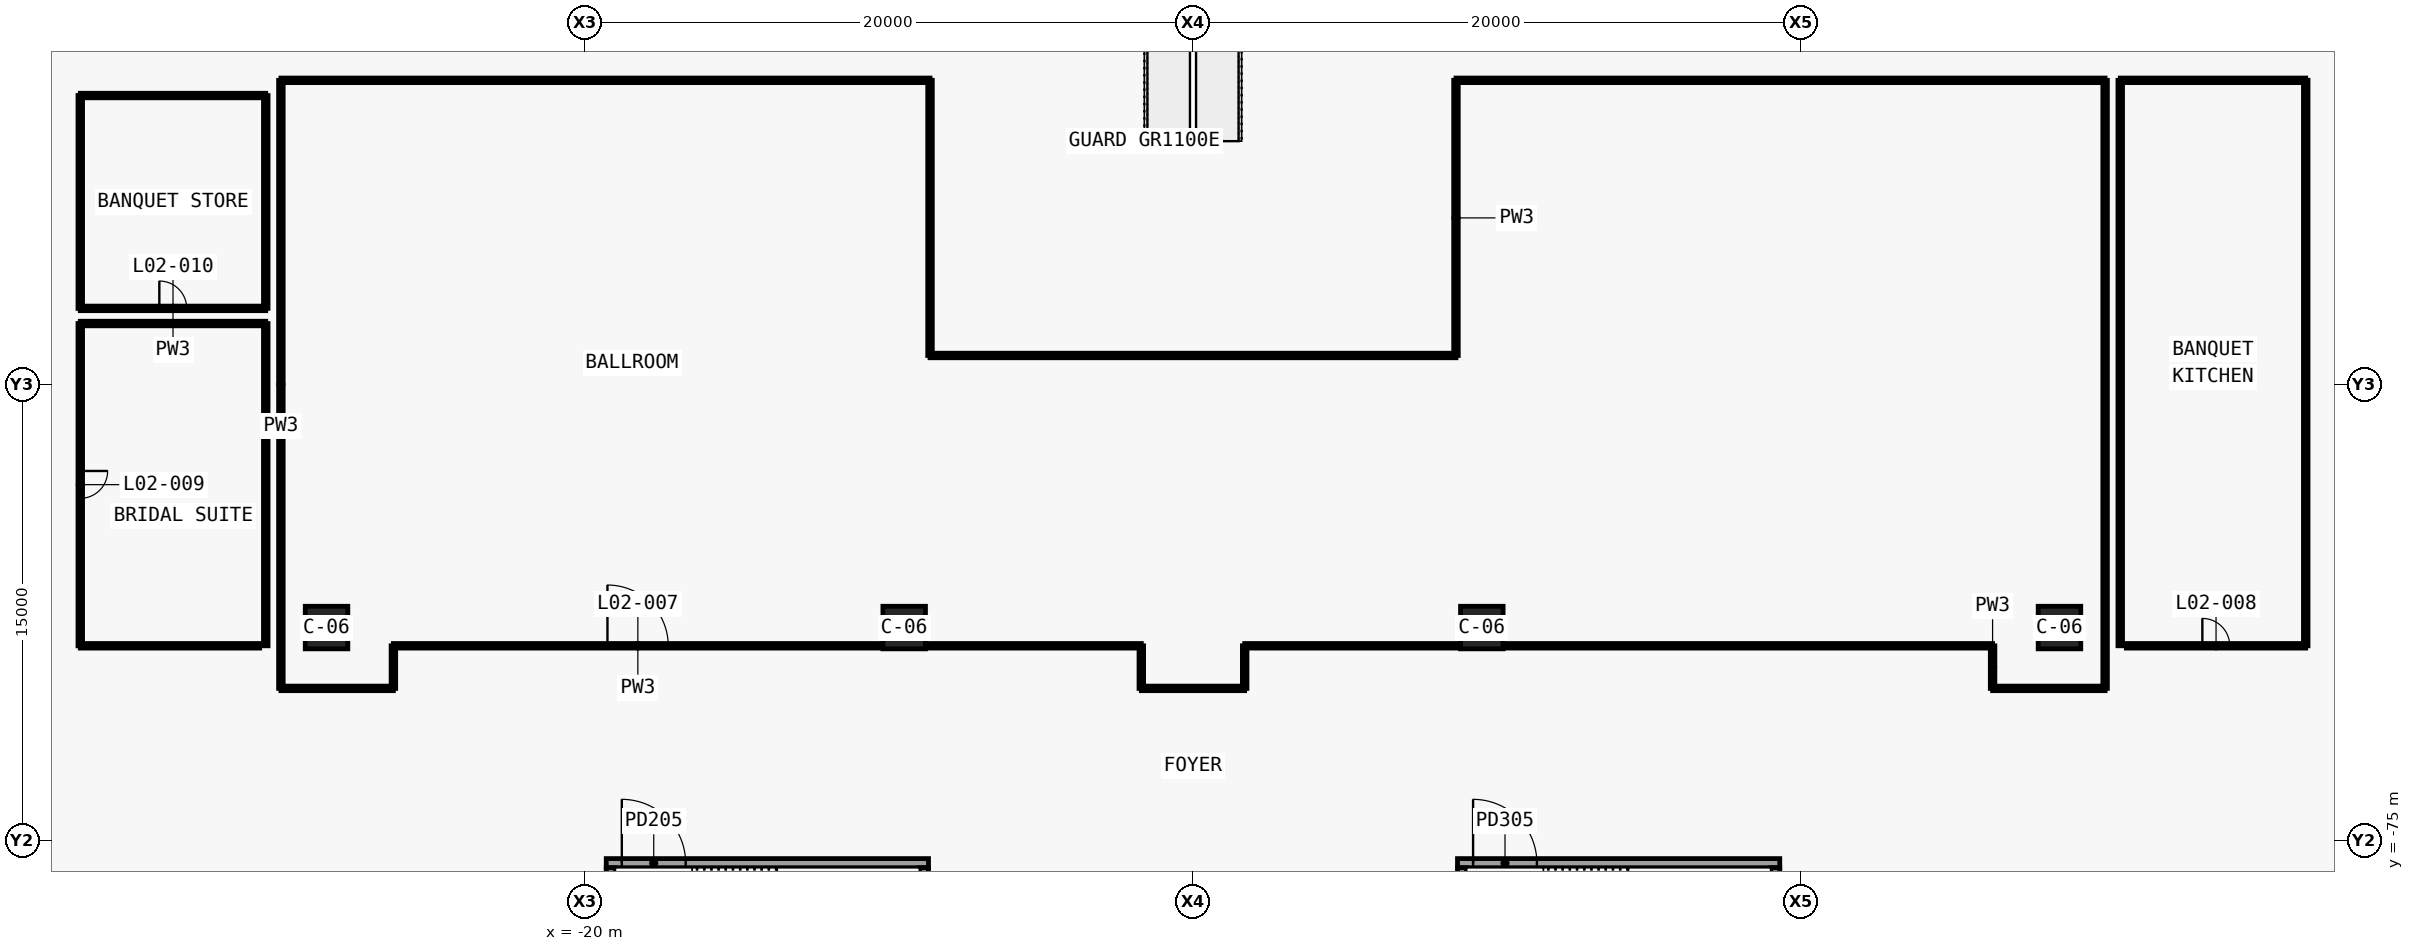
"""IFC4 building model, lengths in metres.
Left out: names, types, materials, properties, quantities, classifications, styles, units other than length and angle.
Written with IfcOpenShell. Run it as: python <this file> out.ifc"""

import sys

from ifc_helpers import new_model, si_unit, direction, frame, frame_2d, origin, origin_2d, place, context, subcontext, project, spatial, rectangle, extrude, element, fill, save


model = new_model("IFC4")
c1 = context("Model", 3, precision=1e-05, world=origin(), true_north=direction((0.0, 1.0)))
c2 = subcontext(c1, "Body", "Model", "MODEL_VIEW")
j1 = project(units=[si_unit("LENGTHUNIT", "METRE"), si_unit("PLANEANGLEUNIT", "RADIAN")], contexts=[c1])
p1 = place(None, origin())
s1 = spatial("IfcSite", under=j1, at=p1, CompositionType="ELEMENT")
p2 = place(p1, origin())
s2 = spatial("IfcBuilding", under=s1, at=p2, CompositionType="ELEMENT")
p3 = place(p2, frame((0.0, 0.0, 18.0)))
s3 = spatial("IfcBuildingStorey", under=s2, at=p3, CompositionType="ELEMENT", Elevation=18.0)
p4 = place(p3, frame((-19.3, -75.75, 0.0), z_axis=(0.0, 0.0, 1.0), x_axis=(1.0, 0.0, 0.0)))
e1 = element("IfcWall", 1, at=p4, inside=s3, PredefinedType="SOLIDWALL", context=c2, shape_type="SweptSolid", body=[
    extrude(rectangle(XDim=10.6, YDim=0.3, at=frame_2d((5.3, 0.0))), origin(), (0.0, 0.0, 1.0), 8.0),
])
p5 = place(p4, frame((0.512, 0.0, 0.0)))
e2 = element("IfcOpeningElement", 2, at=p5, cuts=e1, PredefinedType="OPENING", context=c2, shape_type="SweptSolid", body=[
    extrude(rectangle(XDim=2.1, YDim=2.1, at=frame_2d((1.05, 1.05))), frame((0.0, 0.16, 0.0), z_axis=(0.0, -1.0, 0.0), x_axis=(1.0, 0.0, 0.0)), (0.0, 0.0, 1.0), 0.32),
])
for number, where, z_axis, x_axis in (
    (3, (-19.15, -81.1, 0.0), (0.0, 0.0, 1.0), (0.0, 1.0, 0.0)),
    (4, (-8.85, -81.1, 0.0), (0.0, 0.0, 1.0), (0.0, 1.0, 0.0)),
):
    element("IfcWall", number, at=place(p3, frame(where, z_axis=z_axis, x_axis=x_axis)), inside=s3, PredefinedType="SOLIDWALL", context=c2, shape_type="SweptSolid", body=[
        extrude(rectangle(XDim=5.2, YDim=0.3, at=frame_2d((2.6, 0.0))), origin(), (0.0, 0.0, 1.0), 8.0),
    ])
p6 = place(p3, frame((8.7, -75.75, 0.0), z_axis=(0.0, 0.0, 1.0), x_axis=(1.0, 0.0, 0.0)))
e5 = element("IfcWall", 5, at=p6, inside=s3, PredefinedType="SOLIDWALL", context=c2, shape_type="SweptSolid", body=[
    extrude(rectangle(XDim=10.6, YDim=0.3, at=frame_2d((5.3, 0.0))), origin(), (0.0, 0.0, 1.0), 8.0),
])
p7 = place(p6, frame((0.512, 0.0, 0.0)))
e6 = element("IfcOpeningElement", 6, at=p7, cuts=e5, PredefinedType="OPENING", context=c2, shape_type="SweptSolid", body=[
    extrude(rectangle(XDim=2.1, YDim=2.1, at=frame_2d((1.05, 1.05))), frame((0.0, 0.16, 0.0), z_axis=(0.0, -1.0, 0.0), x_axis=(1.0, 0.0, 0.0)), (0.0, 0.0, 1.0), 0.32),
])
for number, where, z_axis, x_axis in (
    (7, (8.85, -81.1, 0.0), (0.0, 0.0, 1.0), (0.0, 1.0, 0.0)),
    (8, (19.15, -81.1, 0.0), (0.0, 0.0, 1.0), (0.0, 1.0, 0.0)),
):
    element("IfcWall", number, at=place(p3, frame(where, z_axis=z_axis, x_axis=x_axis)), inside=s3, PredefinedType="SOLIDWALL", context=c2, shape_type="SweptSolid", body=[
        extrude(rectangle(XDim=5.2, YDim=0.3, at=frame_2d((2.6, 0.0))), origin(), (0.0, 0.0, 1.0), 8.0),
    ])
for number, where, z_axis, x_axis in (
    (9, (-28.5, -68.0, 0.0), (0.0, 0.0, 1.0), (1.0, 0.0, 0.0)),
    (10, (-9.5, -68.0, 0.0), (0.0, 0.0, 1.0), (1.0, 0.0, 0.0)),
    (11, (9.5, -68.0, 0.0), (0.0, 0.0, 1.0), (1.0, 0.0, 0.0)),
    (12, (28.5, -68.0, 0.0), (0.0, 0.0, 1.0), (1.0, 0.0, 0.0)),
):
    element("IfcColumn", number, at=place(p3, frame(where, z_axis=z_axis, x_axis=x_axis)), inside=s3, PredefinedType="COLUMN", context=c2, shape_type="SweptSolid", body=[
        extrude(rectangle(XDim=1.4, YDim=1.4, at=origin_2d()), origin(), (0.0, 0.0, 1.0), 8.0),
    ])
p8 = place(p3, frame((26.301, -70.001, 0.0), z_axis=(0.0, 0.0, 1.0), x_axis=(1.0, 0.0, 0.0)))
e13 = element("IfcWall", 13, at=p8, inside=s3, PredefinedType="PARTITIONING", context=c2, shape_type="SweptSolid", body=[
    extrude(rectangle(XDim=3.699, YDim=0.15, at=frame_2d((1.85, 0.0))), origin(), (0.0, 0.0, 1.0), 6.58),
])
p9 = place(p3, frame((30.001, -70.0, 0.0), z_axis=(0.0, 0.0, 1.0), x_axis=(0.0, 1.0, 0.0)))
e14 = element("IfcWall", 14, at=p9, inside=s3, PredefinedType="PARTITIONING", context=c2, shape_type="SweptSolid", body=[
    extrude(rectangle(XDim=20.0, YDim=0.15, at=frame_2d((10.0, 0.0))), origin(), (0.0, 0.0, 1.0), 6.58),
])
for number, where, z_axis, x_axis in (
    (15, (30.0, -49.999, 0.0), (0.0, 0.0, 1.0), (-1.0, 0.0, 0.0)),
    (16, (-8.651, -49.999, 0.0), (0.0, 0.0, 1.0), (-1.0, 0.0, 0.0)),
):
    element("IfcWall", number, at=place(p3, frame(where, z_axis=z_axis, x_axis=x_axis)), inside=s3, PredefinedType="PARTITIONING", context=c2, shape_type="SweptSolid", body=[
        extrude(rectangle(XDim=21.349, YDim=0.15, at=frame_2d((10.675, 0.0))), origin(), (0.0, 0.0, 1.0), 6.58),
    ])
p10 = place(p3, frame((-30.001, -50.0, 0.0), z_axis=(0.0, 0.0, 1.0), x_axis=(0.0, -1.0, 0.0)))
e17 = element("IfcWall", 17, at=p10, inside=s3, PredefinedType="PARTITIONING", context=c2, shape_type="SweptSolid", body=[
    extrude(rectangle(XDim=20.0, YDim=0.15, at=frame_2d((10.0, 0.0))), origin(), (0.0, 0.0, 1.0), 6.58),
])
p11 = place(p3, frame((-30.0, -70.001, 0.0), z_axis=(0.0, 0.0, 1.0), x_axis=(1.0, 0.0, 0.0)))
e18 = element("IfcWall", 18, at=p11, inside=s3, PredefinedType="PARTITIONING", context=c2, shape_type="SweptSolid", body=[
    extrude(rectangle(XDim=3.699, YDim=0.15, at=frame_2d((1.85, 0.0))), origin(), (0.0, 0.0, 1.0), 6.58),
])
p12 = place(p3, frame((36.599, -49.999, 0.0), z_axis=(0.0, 0.0, 1.0), x_axis=(-1.0, 0.0, 0.0)))
e19 = element("IfcWall", 19, at=p12, inside=s3, PredefinedType="PARTITIONING", context=c2, shape_type="SweptSolid", body=[
    extrude(rectangle(XDim=6.099, YDim=0.15, at=frame_2d((3.05, 0.0))), origin(), (0.0, 0.0, 1.0), 7.6),
])
p13 = place(p3, frame((30.499, -50.0, 0.0), z_axis=(0.0, 0.0, 1.0), x_axis=(0.0, -1.0, 0.0)))
e20 = element("IfcWall", 20, at=p13, inside=s3, PredefinedType="PARTITIONING", context=c2, shape_type="SweptSolid", body=[
    extrude(rectangle(XDim=18.599, YDim=0.15, at=frame_2d((9.3, 0.0))), origin(), (0.0, 0.0, 1.0), 6.58),
])
p14 = place(p3, frame((-30.499, -68.6, 0.0), z_axis=(0.0, 0.0, 1.0), x_axis=(0.0, 1.0, 0.0)))
e21 = element("IfcWall", 21, at=p14, inside=s3, PredefinedType="PARTITIONING", context=c2, shape_type="SweptSolid", body=[
    extrude(rectangle(XDim=10.6, YDim=0.15, at=frame_2d((5.3, 0.0))), origin(), (0.0, 0.0, 1.0), 6.58),
])
p15 = place(p3, frame((-30.5, -57.999, 0.0), z_axis=(0.0, 0.0, 1.0), x_axis=(-1.0, 0.0, 0.0)))
e22 = element("IfcWall", 22, at=p15, inside=s3, PredefinedType="PARTITIONING", context=c2, shape_type="SweptSolid", body=[
    extrude(rectangle(XDim=6.099, YDim=0.15, at=frame_2d((3.05, 0.0))), origin(), (0.0, 0.0, 1.0), 7.6),
])
p16 = place(p3, frame((-36.599, -57.501, 0.0), z_axis=(0.0, 0.0, 1.0), x_axis=(1.0, 0.0, 0.0)))
e23 = element("IfcWall", 23, at=p16, inside=s3, PredefinedType="PARTITIONING", context=c2, shape_type="SweptSolid", body=[
    extrude(rectangle(XDim=6.099, YDim=0.15, at=frame_2d((3.05, 0.0))), origin(), (0.0, 0.0, 1.0), 7.6),
])
p17 = place(p16, frame((2.6, 0.0, 0.0)))
e24 = element("IfcOpeningElement", 24, at=p17, cuts=e23, PredefinedType="OPENING", context=c2, shape_type="SweptSolid", body=[
    extrude(rectangle(XDim=0.9, YDim=2.1, at=frame_2d((0.45, 1.05))), frame((0.0, 0.085, 0.0), z_axis=(0.0, -1.0, 0.0), x_axis=(1.0, 0.0, 0.0)), (0.0, 0.0, 1.0), 0.17),
])
p18 = place(p3, frame((-30.499, -57.5, 0.0), z_axis=(0.0, 0.0, 1.0), x_axis=(0.0, 1.0, 0.0)))
e25 = element("IfcWall", 25, at=p18, inside=s3, PredefinedType="PARTITIONING", context=c2, shape_type="SweptSolid", body=[
    extrude(rectangle(XDim=7.0, YDim=0.15, at=frame_2d((3.5, 0.0))), origin(), (0.0, 0.0, 1.0), 6.98),
])
p19 = place(p3, frame((-30.5, -50.499, 0.0), z_axis=(0.0, 0.0, 1.0), x_axis=(-1.0, 0.0, 0.0)))
e26 = element("IfcWall", 26, at=p19, inside=s3, PredefinedType="PARTITIONING", context=c2, shape_type="SweptSolid", body=[
    extrude(rectangle(XDim=6.099, YDim=0.15, at=frame_2d((3.05, 0.0))), origin(), (0.0, 0.0, 1.0), 7.6),
])
p20 = place(p3, frame((-1.699, -70.001, 0.0), z_axis=(0.0, 0.0, 1.0), x_axis=(1.0, 0.0, 0.0)))
e27 = element("IfcWall", 27, at=p20, inside=s3, PredefinedType="PARTITIONING", context=c2, shape_type="SweptSolid", body=[
    extrude(rectangle(XDim=3.398, YDim=0.15, at=frame_2d((1.699, 0.0))), origin(), (0.0, 0.0, 1.0), 7.6),
])
p21 = place(p3, frame((-26.3, -70.002, 0.0), z_axis=(0.0, 0.0, 1.0), x_axis=(0.0, 1.0, 0.0)))
e28 = element("IfcWall", 28, at=p21, inside=s3, PredefinedType="PARTITIONING", context=c2, shape_type="SweptSolid", body=[
    extrude(rectangle(XDim=1.402, YDim=0.15, at=frame_2d((0.701, 0.0))), origin(), (0.0, 0.0, 1.0), 7.6),
])
p22 = place(p3, frame((-26.3, -68.6, 0.0), z_axis=(0.0, 0.0, 1.0), x_axis=(1.0, 0.0, 0.0)))
e29 = element("IfcWall", 29, at=p22, inside=s3, PredefinedType="PARTITIONING", context=c2, shape_type="SweptSolid", body=[
    extrude(rectangle(XDim=16.08, YDim=0.15, at=frame_2d((8.04, 0.0))), origin(), (0.0, 0.0, 1.0), 7.6),
])
p23 = place(p22, frame((7.04, 0.0, 0.0)))
e30 = element("IfcOpeningElement", 30, at=p23, cuts=e29, PredefinedType="OPENING", context=c2, shape_type="SweptSolid", body=[
    extrude(rectangle(XDim=2.0, YDim=2.4, at=frame_2d((1.0, 1.2))), frame((0.0, 0.085, 0.0), z_axis=(0.0, -1.0, 0.0), x_axis=(1.0, 0.0, 0.0)), (0.0, 0.0, 1.0), 0.17),
])
p24 = place(p3, frame((-8.78, -68.6, 0.0), z_axis=(0.0, 0.0, 1.0), x_axis=(1.0, 0.0, 0.0)))
e31 = element("IfcWall", 31, at=p24, inside=s3, PredefinedType="PARTITIONING", context=c2, shape_type="SweptSolid", body=[
    extrude(rectangle(XDim=7.08, YDim=0.15, at=frame_2d((3.54, 0.0))), origin(), (0.0, 0.0, 1.0), 7.6),
])
for number, where, z_axis, x_axis in (
    (32, (-1.7, -68.6, 0.0), (0.0, 0.0, 1.0), (0.0, -1.0, 0.0)),
    (33, (1.7, -70.002, 0.0), (0.0, 0.0, 1.0), (0.0, 1.0, 0.0)),
):
    element("IfcWall", number, at=place(p3, frame(where, z_axis=z_axis, x_axis=x_axis)), inside=s3, PredefinedType="PARTITIONING", context=c2, shape_type="SweptSolid", body=[
        extrude(rectangle(XDim=1.402, YDim=0.15, at=frame_2d((0.701, 0.0))), origin(), (0.0, 0.0, 1.0), 7.6),
    ])
p25 = place(p3, frame((1.7, -68.6, 0.0), z_axis=(0.0, 0.0, 1.0), x_axis=(1.0, 0.0, 0.0)))
e34 = element("IfcWall", 34, at=p25, inside=s3, PredefinedType="PARTITIONING", context=c2, shape_type="SweptSolid", body=[
    extrude(rectangle(XDim=7.08, YDim=0.15, at=frame_2d((3.54, 0.0))), origin(), (0.0, 0.0, 1.0), 7.6),
])
p26 = place(p3, frame((10.22, -68.6, 0.0), z_axis=(0.0, 0.0, 1.0), x_axis=(1.0, 0.0, 0.0)))
e35 = element("IfcWall", 35, at=p26, inside=s3, PredefinedType="PARTITIONING", context=c2, shape_type="SweptSolid", body=[
    extrude(rectangle(XDim=16.08, YDim=0.15, at=frame_2d((8.04, 0.0))), origin(), (0.0, 0.0, 1.0), 7.6),
])
p27 = place(p3, frame((26.3, -68.6, 0.0), z_axis=(0.0, 0.0, 1.0), x_axis=(0.0, -1.0, 0.0)))
e36 = element("IfcWall", 36, at=p27, inside=s3, PredefinedType="PARTITIONING", context=c2, shape_type="SweptSolid", body=[
    extrude(rectangle(XDim=1.402, YDim=0.15, at=frame_2d((0.701, 0.0))), origin(), (0.0, 0.0, 1.0), 7.6),
])
p28 = place(p3, frame((30.7, -68.6, 0.0), z_axis=(0.0, 0.0, 1.0), x_axis=(1.0, 0.0, 0.0)))
e37 = element("IfcWall", 37, at=p28, inside=s3, PredefinedType="PARTITIONING", context=c2, shape_type="SweptSolid", body=[
    extrude(rectangle(XDim=5.9, YDim=0.15, at=frame_2d((2.95, 0.0))), origin(), (0.0, 0.0, 1.0), 7.6),
])
p29 = place(p28, frame((2.5, 0.0, 0.0)))
e38 = element("IfcOpeningElement", 38, at=p29, cuts=e37, PredefinedType="OPENING", context=c2, shape_type="SweptSolid", body=[
    extrude(rectangle(XDim=0.9, YDim=2.1, at=frame_2d((0.45, 1.05))), frame((0.0, 0.085, 0.0), z_axis=(0.0, -1.0, 0.0), x_axis=(1.0, 0.0, 0.0)), (0.0, 0.0, 1.0), 0.17),
])
p30 = place(p3, frame((36.6, -68.6, 0.0), z_axis=(0.0, 0.0, 1.0), x_axis=(0.0, 1.0, 0.0)))
e39 = element("IfcWall", 39, at=p30, inside=s3, PredefinedType="PARTITIONING", context=c2, shape_type="SweptSolid", body=[
    extrude(rectangle(XDim=18.602, YDim=0.15, at=frame_2d((9.301, 0.0))), origin(), (0.0, 0.0, 1.0), 6.58),
])
p31 = place(p3, frame((-36.6, -57.998, 0.0), z_axis=(0.0, 0.0, 1.0), x_axis=(0.0, -1.0, 0.0)))
e40 = element("IfcWall", 40, at=p31, inside=s3, PredefinedType="PARTITIONING", context=c2, shape_type="SweptSolid", body=[
    extrude(rectangle(XDim=10.602, YDim=0.15, at=frame_2d((5.301, 0.0))), origin(), (0.0, 0.0, 1.0), 6.58),
])
p32 = place(p31, frame((4.851, 0.0, 0.0)))
e41 = element("IfcOpeningElement", 41, at=p32, cuts=e40, PredefinedType="OPENING", context=c2, shape_type="SweptSolid", body=[
    extrude(rectangle(XDim=0.9, YDim=2.1, at=frame_2d((0.45, 1.05))), frame((0.0, 0.085, 0.0), z_axis=(0.0, -1.0, 0.0), x_axis=(1.0, 0.0, 0.0)), (0.0, 0.0, 1.0), 0.17),
])
p33 = place(p3, frame((-36.6, -68.6, 0.0), z_axis=(0.0, 0.0, 1.0), x_axis=(1.0, 0.0, 0.0)))
e42 = element("IfcWall", 42, at=p33, inside=s3, PredefinedType="PARTITIONING", context=c2, shape_type="SweptSolid", body=[
    extrude(rectangle(XDim=5.9, YDim=0.15, at=frame_2d((2.95, 0.0))), origin(), (0.0, 0.0, 1.0), 7.6),
])
p34 = place(p3, frame((-36.6, -50.498, 0.0), z_axis=(0.0, 0.0, 1.0), x_axis=(0.0, -1.0, 0.0)))
e43 = element("IfcWall", 43, at=p34, inside=s3, PredefinedType="PARTITIONING", context=c2, shape_type="SweptSolid", body=[
    extrude(rectangle(XDim=7.003, YDim=0.15, at=frame_2d((3.502, 0.0))), origin(), (0.0, 0.0, 1.0), 6.98),
])
p35 = place(p3, frame((8.65, -59.05, 0.0), z_axis=(0.0, 0.0, 1.0), x_axis=(-1.0, 0.0, 0.0)))
e44 = element("IfcWall", 44, at=p35, inside=s3, PredefinedType="PARTITIONING", context=c2, shape_type="SweptSolid", body=[
    extrude(rectangle(XDim=17.3, YDim=0.15, at=frame_2d((8.65, 0.0))), origin(), (0.0, 0.0, 1.0), 7.6),
])
for number, where, z_axis, x_axis in (
    (45, (-8.65, -59.05, 0.0), (0.0, 0.0, 1.0), (0.0, 1.0, 0.0)),
    (46, (8.65, -49.998, 0.0), (0.0, 0.0, 1.0), (0.0, -1.0, 0.0)),
):
    element("IfcWall", number, at=place(p3, frame(where, z_axis=z_axis, x_axis=x_axis)), inside=s3, PredefinedType="PARTITIONING", context=c2, shape_type="SweptSolid", body=[
        extrude(rectangle(XDim=9.052, YDim=0.15, at=frame_2d((4.526, 0.0))), origin(), (0.0, 0.0, 1.0), 6.98),
    ])
p36 = place(p5, origin())
e47 = element("IfcDoor", 47, at=p36, inside=s3, OperationType="DOUBLE_DOOR_SINGLE_SWING", PredefinedType="DOOR", context=c2, shape_type="SweptSolid", body=[
    extrude(rectangle(XDim=2.1, YDim=2.1, at=frame_2d((1.05, 1.05))), frame((0.0, 0.025, 0.0), z_axis=(0.0, -1.0, 0.0), x_axis=(1.0, 0.0, 0.0)), (0.0, 0.0, 1.0), 0.05),
])
fill(e2, e47)
p37 = place(p7, origin())
e48 = element("IfcDoor", 48, at=p37, inside=s3, OperationType="DOUBLE_DOOR_SINGLE_SWING", PredefinedType="DOOR", context=c2, shape_type="SweptSolid", body=[
    extrude(rectangle(XDim=2.1, YDim=2.1, at=frame_2d((1.05, 1.05))), frame((0.0, 0.025, 0.0), z_axis=(0.0, -1.0, 0.0), x_axis=(1.0, 0.0, 0.0)), (0.0, 0.0, 1.0), 0.05),
])
fill(e6, e48)
p38 = place(p23, origin())
e49 = element("IfcDoor", 49, at=p38, inside=s3, OperationType="DOUBLE_DOOR_SINGLE_SWING", PredefinedType="DOOR", context=c2, shape_type="SweptSolid", body=[
    extrude(rectangle(XDim=2.0, YDim=2.4, at=frame_2d((1.0, 1.2))), frame((0.0, 0.025, 0.0), z_axis=(0.0, -1.0, 0.0), x_axis=(1.0, 0.0, 0.0)), (0.0, 0.0, 1.0), 0.05),
])
fill(e30, e49)
p39 = place(p29, origin())
e50 = element("IfcDoor", 50, at=p39, inside=s3, OperationType="SINGLE_SWING_LEFT", PredefinedType="DOOR", context=c2, shape_type="SweptSolid", body=[
    extrude(rectangle(XDim=0.9, YDim=2.1, at=frame_2d((0.45, 1.05))), frame((0.0, 0.025, 0.0), z_axis=(0.0, -1.0, 0.0), x_axis=(1.0, 0.0, 0.0)), (0.0, 0.0, 1.0), 0.05),
])
fill(e38, e50)
p40 = place(p32, origin())
e51 = element("IfcDoor", 51, at=p40, inside=s3, OperationType="SINGLE_SWING_RIGHT", PredefinedType="DOOR", context=c2, shape_type="SweptSolid", body=[
    extrude(rectangle(XDim=0.9, YDim=2.1, at=frame_2d((0.45, 1.05))), frame((0.0, 0.025, 0.0), z_axis=(0.0, -1.0, 0.0), x_axis=(1.0, 0.0, 0.0)), (0.0, 0.0, 1.0), 0.05),
])
fill(e41, e51)
p41 = place(p17, origin())
e52 = element("IfcDoor", 52, at=p41, inside=s3, OperationType="SINGLE_SWING_RIGHT", PredefinedType="DOOR", context=c2, shape_type="SweptSolid", body=[
    extrude(rectangle(XDim=0.9, YDim=2.1, at=frame_2d((0.45, 1.05))), frame((0.0, 0.025, 0.0), z_axis=(0.0, -1.0, 0.0), x_axis=(1.0, 0.0, 0.0)), (0.0, 0.0, 1.0), 0.05),
])
fill(e24, e52)
save(model, sys.argv[1])
